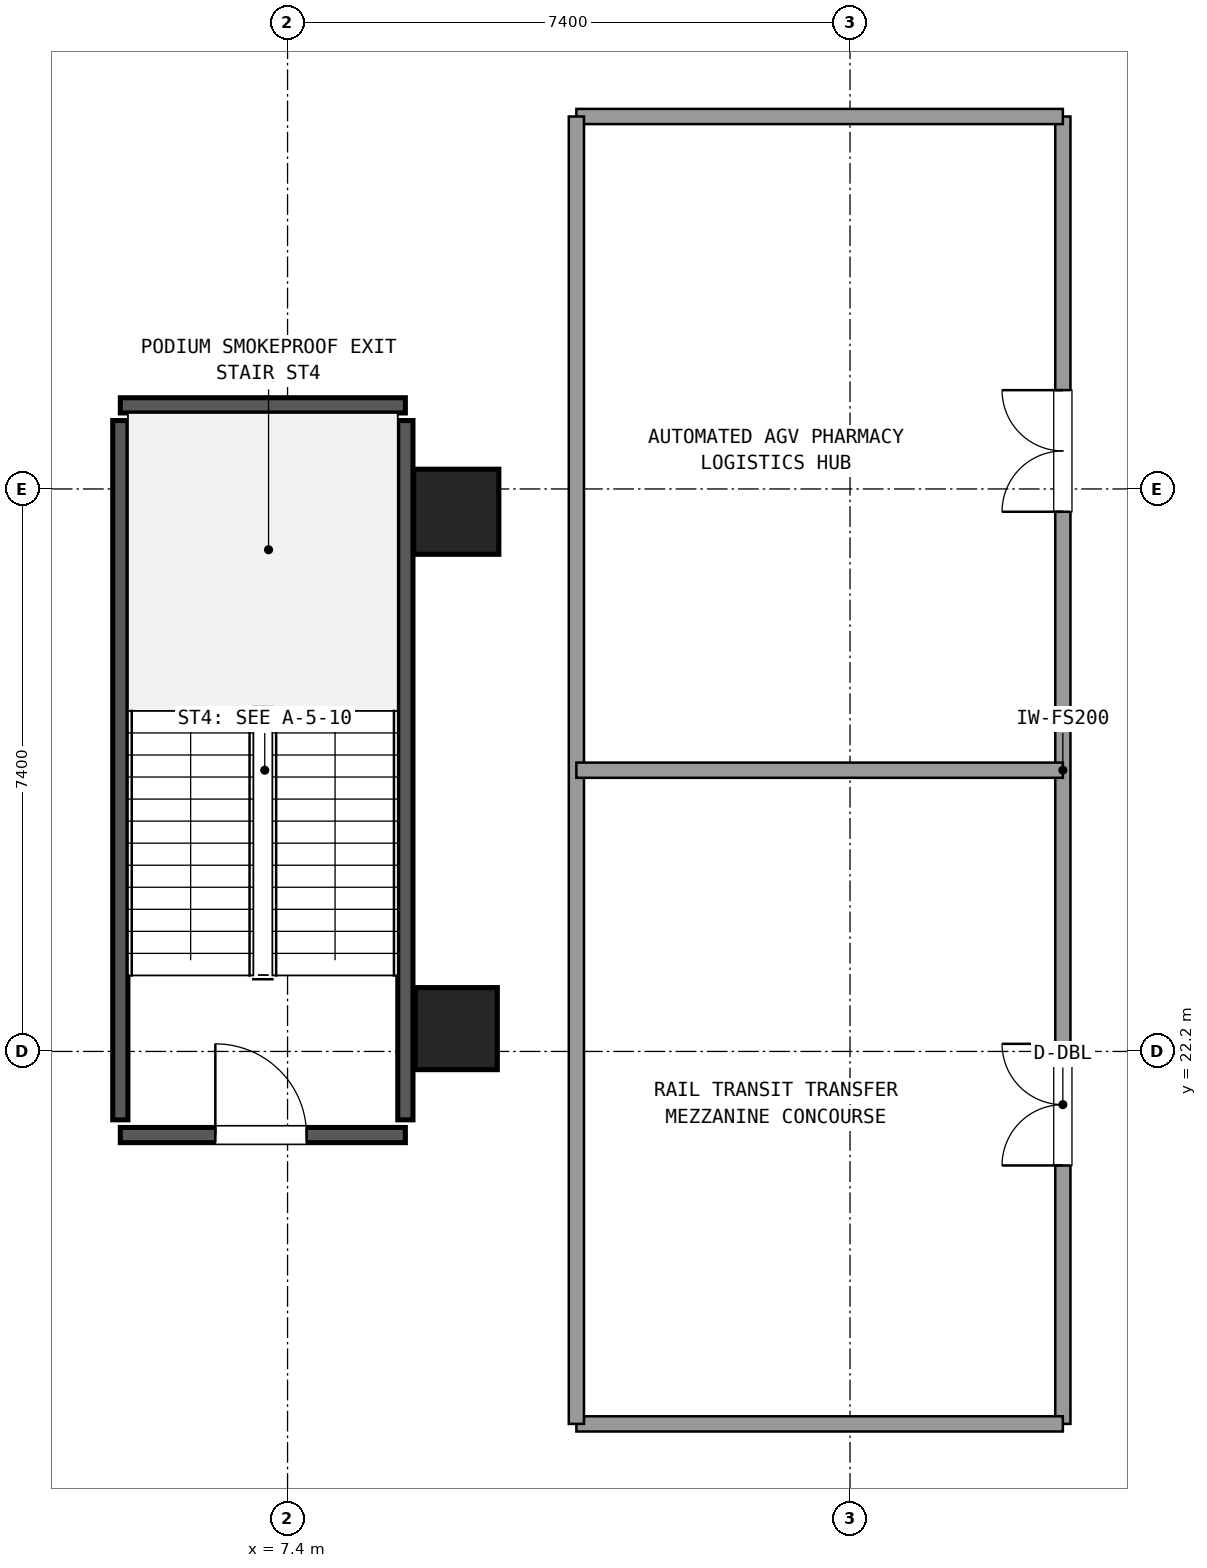
"""IFC4 building model, lengths in metres.
Left out: names, types, materials, properties, quantities, classifications, styles, units other than length and angle.
Written with IfcOpenShell. Run it as: python <this file> out.ifc"""

import sys

from ifc_helpers import new_model, si_unit, direction, frame, frame_2d, origin, origin_2d, place, context, subcontext, project, spatial, rectangle, circle, extrude, element, fill, save


model = new_model("IFC4")
c1 = context("Model", 3, precision=1e-05, world=origin(), true_north=direction((0.0, 1.0)))
c2 = subcontext(c1, "Body", "Model", "MODEL_VIEW")
j1 = project(units=[si_unit("LENGTHUNIT", "METRE"), si_unit("PLANEANGLEUNIT", "RADIAN")], contexts=[c1])
p1 = place(None, origin())
s1 = spatial("IfcSite", under=j1, at=p1, CompositionType="ELEMENT")
p2 = place(p1, origin())
s2 = spatial("IfcBuilding", under=s1, at=p2, CompositionType="ELEMENT")
p3 = place(p2, frame((0.0, 0.0, -4.86)))
s3 = spatial("IfcBuildingStorey", under=s2, at=p3, CompositionType="ELEMENT", Elevation=-4.86)
p4 = place(p3, frame((9.62, 22.5, 0.0), z_axis=(0.0, 0.0, 1.0), x_axis=(1.0, 0.0, 0.0)))
e1 = element("IfcColumn", 1, at=p4, inside=s3, PredefinedType="COLUMN", context=c2, shape_type="SweptSolid", body=[
    extrude(rectangle(XDim=1.08, YDim=1.08, at=origin_2d()), origin(), (0.0, 0.0, 1.0), 4.86),
])
p5 = place(p3, frame((9.62, 29.3, 0.0), z_axis=(0.0, 0.0, 1.0), x_axis=(1.0, 0.0, 0.0)))
e2 = element("IfcColumn", 2, at=p5, inside=s3, PredefinedType="COLUMN", context=c2, shape_type="SweptSolid", body=[
    extrude(circle(Radius=0.56, at=origin_2d()), origin(), (0.0, 0.0, 1.0), 4.86),
])
p6 = place(p3, frame((5.2, 21.1, 0.0), z_axis=(0.0, 0.0, 1.0), x_axis=(1.0, 0.0, 0.0)))
e3 = element("IfcWall", 3, at=p6, inside=s3, PredefinedType="SHEAR", context=c2, shape_type="SweptSolid", body=[
    extrude(rectangle(XDim=3.75, YDim=0.2, at=frame_2d((1.875, 0.0))), origin(), (0.0, 0.0, 1.0), 4.56),
])
p7 = place(p6, frame((1.25, 0.0, 0.0)))
e4 = element("IfcOpeningElement", 4, at=p7, cuts=e3, PredefinedType="OPENING", context=c2, shape_type="SweptSolid", body=[
    extrude(rectangle(XDim=1.2, YDim=2.15, at=frame_2d((0.6, 1.075))), frame((0.0, 0.11, 0.0), z_axis=(0.0, -1.0, 0.0), x_axis=(1.0, 0.0, 0.0)), (0.0, 0.0, 1.0), 0.22),
])
p8 = place(p3, frame((5.2, 30.7, 0.0), z_axis=(0.0, 0.0, 1.0), x_axis=(1.0, 0.0, 0.0)))
e5 = element("IfcWall", 5, at=p8, inside=s3, PredefinedType="SHEAR", context=c2, shape_type="SweptSolid", body=[
    extrude(rectangle(XDim=3.75, YDim=0.2, at=frame_2d((1.875, 0.0))), origin(), (0.0, 0.0, 1.0), 4.56),
])
for number, where, z_axis, x_axis in (
    (6, (5.2, 21.3, 0.0), (0.0, 0.0, 1.0), (0.0, 1.0, 0.0)),
    (7, (8.95, 21.3, 0.0), (0.0, 0.0, 1.0), (0.0, 1.0, 0.0)),
):
    element("IfcWall", number, at=place(p3, frame(where, z_axis=z_axis, x_axis=x_axis)), inside=s3, PredefinedType="SHEAR", context=c2, shape_type="SweptSolid", body=[
        extrude(rectangle(XDim=9.2, YDim=0.2, at=frame_2d((4.6, 0.0))), origin(), (0.0, 0.0, 1.0), 4.56),
    ])
p9 = place(p3, frame((17.6, 17.3, 0.0), z_axis=(0.0, 0.0, 1.0), x_axis=(0.0, 1.0, 0.0)))
e8 = element("IfcWall", 8, at=p9, inside=s3, PredefinedType="SOLIDWALL", context=c2, shape_type="SweptSolid", body=[
    extrude(rectangle(XDim=17.2, YDim=0.2, at=frame_2d((8.6, 0.0))), origin(), (0.0, 0.0, 1.0), 3.85),
])
p10 = place(p9, frame((3.4, 0.0, 0.0)))
e9 = element("IfcOpeningElement", 9, at=p10, cuts=e8, PredefinedType="OPENING", context=c2, shape_type="SweptSolid", body=[
    extrude(rectangle(XDim=1.6, YDim=2.2, at=frame_2d((0.8, 1.1))), frame((0.0, 0.11, 0.0), z_axis=(0.0, -1.0, 0.0), x_axis=(1.0, 0.0, 0.0)), (0.0, 0.0, 1.0), 0.22),
])
p11 = place(p9, frame((12.0, 0.0, 0.0)))
e10 = element("IfcOpeningElement", 10, at=p11, cuts=e8, PredefinedType="OPENING", context=c2, shape_type="SweptSolid", body=[
    extrude(rectangle(XDim=1.6, YDim=2.2, at=frame_2d((0.8, 1.1))), frame((0.0, 0.11, 0.0), z_axis=(0.0, -1.0, 0.0), x_axis=(1.0, 0.0, 0.0)), (0.0, 0.0, 1.0), 0.22),
])
for number, where, z_axis, x_axis in (
    (11, (11.2, 17.3, 0.0), (0.0, 0.0, 1.0), (1.0, 0.0, 0.0)),
    (12, (11.2, 34.5, 0.0), (0.0, 0.0, 1.0), (1.0, 0.0, 0.0)),
):
    element("IfcWall", number, at=place(p3, frame(where, z_axis=z_axis, x_axis=x_axis)), inside=s3, PredefinedType="SOLIDWALL", context=c2, shape_type="SweptSolid", body=[
        extrude(rectangle(XDim=6.4, YDim=0.2, at=frame_2d((3.2, 0.0))), origin(), (0.0, 0.0, 1.0), 3.85),
    ])
p12 = place(p3, frame((11.2, 17.3, 0.0), z_axis=(0.0, 0.0, 1.0), x_axis=(0.0, 1.0, 0.0)))
e13 = element("IfcWall", 13, at=p12, inside=s3, PredefinedType="SOLIDWALL", context=c2, shape_type="SweptSolid", body=[
    extrude(rectangle(XDim=17.2, YDim=0.2, at=frame_2d((8.6, 0.0))), origin(), (0.0, 0.0, 1.0), 3.85),
])
p13 = place(p3, frame((11.2, 25.9, 0.0), z_axis=(0.0, 0.0, 1.0), x_axis=(1.0, 0.0, 0.0)))
e14 = element("IfcWall", 14, at=p13, inside=s3, PredefinedType="SOLIDWALL", context=c2, shape_type="SweptSolid", body=[
    extrude(rectangle(XDim=6.4, YDim=0.2, at=frame_2d((3.2, 0.0))), origin(), (0.0, 0.0, 1.0), 3.85),
])
p14 = place(p7, origin())
e15 = element("IfcDoor", 15, at=p14, inside=s3, OperationType="SINGLE_SWING_LEFT", PredefinedType="DOOR", context=c2, shape_type="SweptSolid", body=[
    extrude(rectangle(XDim=1.2, YDim=2.15, at=frame_2d((0.6, 1.075))), frame((0.0, 0.025, 0.0), z_axis=(0.0, -1.0, 0.0), x_axis=(1.0, 0.0, 0.0)), (0.0, 0.0, 1.0), 0.05),
])
fill(e4, e15)
p15 = place(p10, origin())
e16 = element("IfcDoor", 16, at=p15, inside=s3, OperationType="DOUBLE_DOOR_SINGLE_SWING", PredefinedType="DOOR", context=c2, shape_type="SweptSolid", body=[
    extrude(rectangle(XDim=1.6, YDim=2.2, at=frame_2d((0.8, 1.1))), frame((0.0, 0.025, 0.0), z_axis=(0.0, -1.0, 0.0), x_axis=(1.0, 0.0, 0.0)), (0.0, 0.0, 1.0), 0.05),
])
fill(e9, e16)
p16 = place(p11, origin())
e17 = element("IfcDoor", 17, at=p16, inside=s3, OperationType="DOUBLE_DOOR_SINGLE_SWING", PredefinedType="DOOR", context=c2, shape_type="SweptSolid", body=[
    extrude(rectangle(XDim=1.6, YDim=2.2, at=frame_2d((0.8, 1.1))), frame((0.0, 0.025, 0.0), z_axis=(0.0, -1.0, 0.0), x_axis=(1.0, 0.0, 0.0)), (0.0, 0.0, 1.0), 0.05),
])
fill(e10, e17)
save(model, sys.argv[1])
